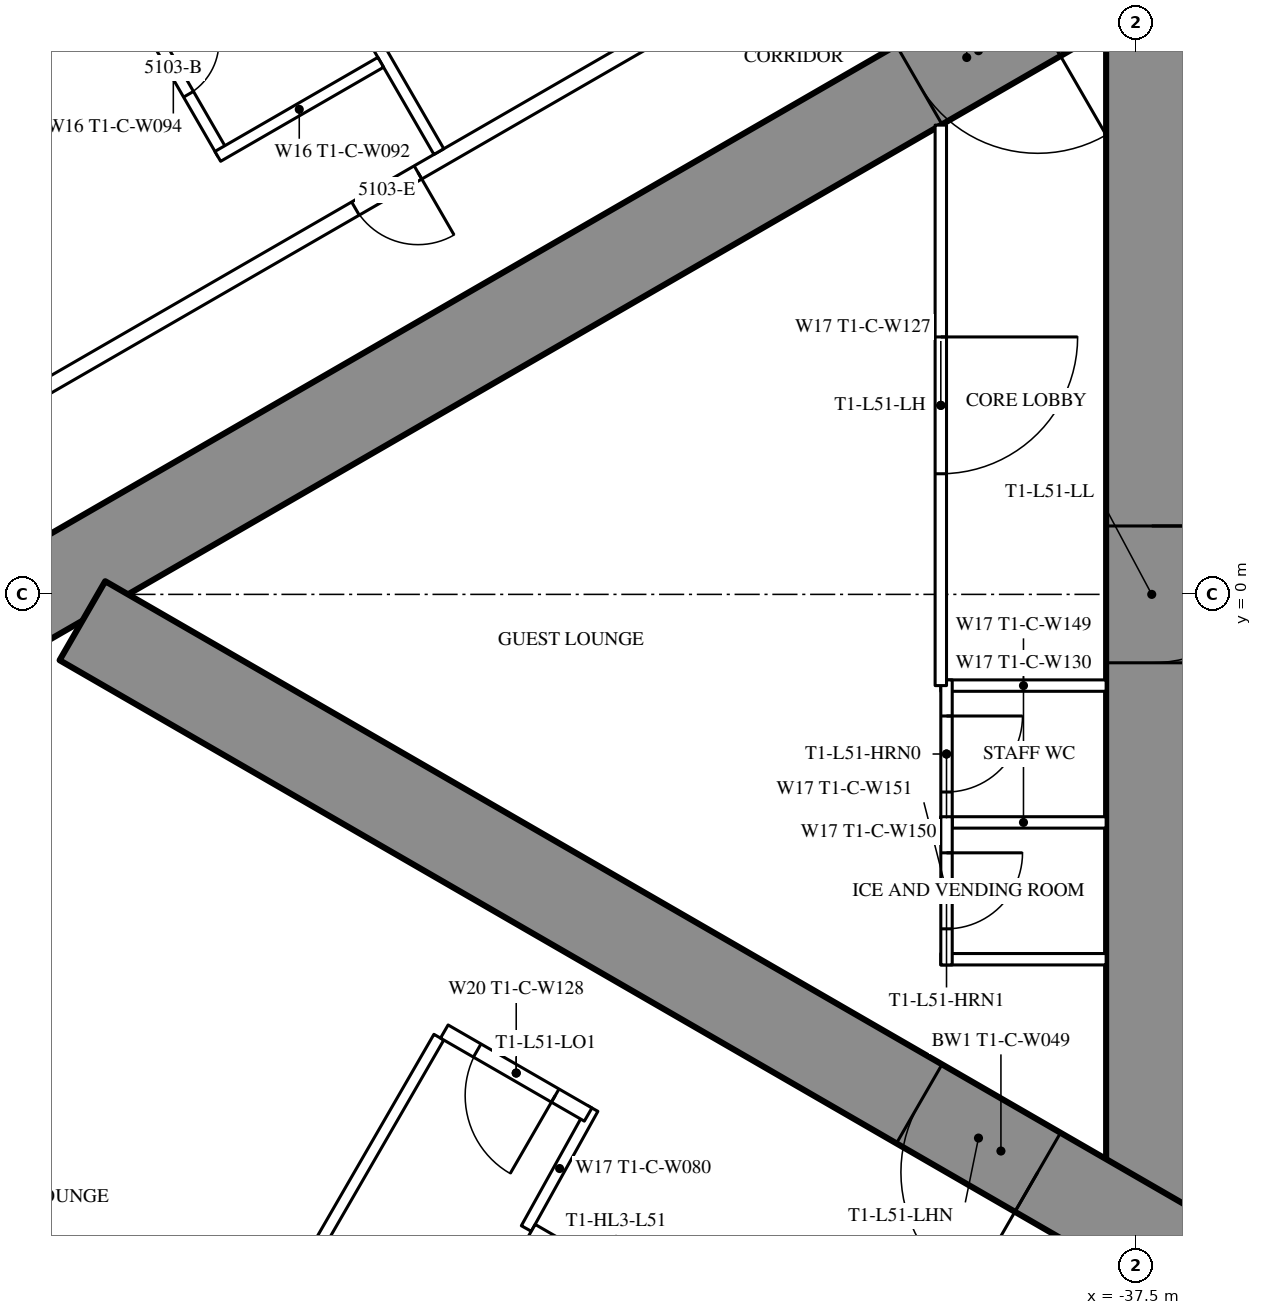
"""IFC4 building model, lengths in metres.
Left out: names, types, materials, properties, quantities, classifications, styles, units other than length and angle.
Written with IfcOpenShell. Run it as: python <this file> out.ifc"""

import sys

from ifc_helpers import new_model, si_unit, direction, frame, frame_2d, origin, place, context, subcontext, project, spatial, rectangle, extrude, element, fill, save


model = new_model("IFC4")
c1 = context("Model", 3, precision=1e-05, world=origin(), true_north=direction((0.0, 1.0)))
c2 = subcontext(c1, "Body", "Model", "MODEL_VIEW")
j1 = project(units=[si_unit("LENGTHUNIT", "METRE"), si_unit("PLANEANGLEUNIT", "RADIAN")], contexts=[c1])
p1 = place(None, origin())
s1 = spatial("IfcSite", under=j1, at=p1, CompositionType="ELEMENT")
p2 = place(p1, origin())
s2 = spatial("IfcBuilding", under=s1, at=p2, CompositionType="ELEMENT")
p3 = place(p2, frame((0.0, 0.0, 191.3)))
s3 = spatial("IfcBuildingStorey", under=s2, at=p3, CompositionType="ELEMENT", Elevation=191.3)
p4 = place(p3, frame((-37.3, 8.6, 0.0), z_axis=(0.0, 0.0, 1.0), x_axis=(0.0, -1.0, 0.0)))
e1 = element("IfcWall", 1, at=p4, inside=s3, PredefinedType="SHEAR", context=c2, shape_type="SweptSolid", body=[
    extrude(rectangle(XDim=17.2, YDim=1.2, at=frame_2d((8.6, 0.0))), origin(), (0.0, 0.0, 1.0), 3.5),
])
p5 = place(p4, frame((7.7, 0.0, 0.0)))
e2 = element("IfcOpeningElement", 2, at=p5, cuts=e1, PredefinedType="OPENING", context=c2, shape_type="SweptSolid", body=[
    extrude(rectangle(XDim=1.8, YDim=2.2, at=frame_2d((0.9, 1.1))), frame((0.0, 0.61, 0.0), z_axis=(0.0, -1.0, 0.0), x_axis=(1.0, 0.0, 0.0)), (0.0, 0.0, 1.0), 1.22),
])
p6 = place(p3, frame((-27.2, 14.3, 0.0), z_axis=(0.0, 0.0, 1.0), x_axis=(-0.866026593062, -0.499997940104, 0.0)))
e3 = element("IfcWall", 3, at=p6, inside=s3, PredefinedType="SHEAR", context=c2, shape_type="SweptSolid", body=[
    extrude(rectangle(XDim=28.946, YDim=1.2, at=frame_2d((14.473, 0.0))), origin(), (0.0, 0.0, 1.0), 3.5),
])
p7 = place(p6, frame((4.6, 0.0, 0.0)))
e4 = element("IfcOpeningElement", 4, at=p7, cuts=e3, PredefinedType="OPENING", context=c2, shape_type="SweptSolid", body=[
    extrude(rectangle(XDim=1.0, YDim=2.2, at=frame_2d((0.5, 1.1))), frame((0.0, 0.61, 0.0), z_axis=(0.0, -1.0, 0.0), x_axis=(1.0, 0.0, 0.0)), (0.0, 0.0, 1.0), 1.22),
])
p8 = place(p6, frame((13.395, 0.0, 0.0)))
e5 = element("IfcOpeningElement", 5, at=p8, cuts=e3, PredefinedType="OPENING", context=c2, shape_type="SweptSolid", body=[
    extrude(rectangle(XDim=1.8, YDim=2.2, at=frame_2d((0.9, 1.1))), frame((0.0, 0.61, 0.0), z_axis=(0.0, -1.0, 0.0), x_axis=(1.0, 0.0, 0.0)), (0.0, 0.0, 1.0), 1.22),
])
p9 = place(p3, frame((-27.2, -14.3, 0.0), z_axis=(0.0, 0.0, 1.0), x_axis=(-0.866024021859, 0.500002393557, 0.0)))
e6 = element("IfcWall", 6, at=p9, inside=s3, PredefinedType="SHEAR", context=c2, shape_type="SweptSolid", body=[
    extrude(rectangle(XDim=27.907, YDim=1.2, at=frame_2d((13.954, 0.0))), origin(), (0.0, 0.0, 1.0), 3.5),
])
p10 = place(p9, frame((4.6, 0.0, 0.0)))
e7 = element("IfcOpeningElement", 7, at=p10, cuts=e6, PredefinedType="OPENING", context=c2, shape_type="SweptSolid", body=[
    extrude(rectangle(XDim=1.0, YDim=2.2, at=frame_2d((0.5, 1.1))), frame((0.0, 0.61, 0.0), z_axis=(0.0, -1.0, 0.0), x_axis=(1.0, 0.0, 0.0)), (0.0, 0.0, 1.0), 1.22),
])
p11 = place(p9, frame((13.395, 0.0, 0.0)))
e8 = element("IfcOpeningElement", 8, at=p11, cuts=e6, PredefinedType="OPENING", context=c2, shape_type="SweptSolid", body=[
    extrude(rectangle(XDim=1.8, YDim=2.2, at=frame_2d((0.9, 1.1))), frame((0.0, 0.61, 0.0), z_axis=(0.0, -1.0, 0.0), x_axis=(1.0, 0.0, 0.0)), (0.0, 0.0, 1.0), 1.22),
])
p12 = place(p3, frame((-27.86, 16.575, 0.0), z_axis=(0.0, 0.0, 1.0), x_axis=(-0.866025533911, -0.499999774615, 0.0)))
e9 = element("IfcWall", 9, at=p12, inside=s3, PredefinedType="PARTITIONING", context=c2, shape_type="SweptSolid", body=[
    extrude(rectangle(XDim=33.149, YDim=0.2, at=frame_2d((16.575, 0.0))), origin(), (0.0, 0.0, 1.0), 3.25),
])
p13 = place(p12, frame((3.75, 0.0, 0.0)))
e10 = element("IfcOpeningElement", 10, at=p13, cuts=e9, PredefinedType="OPENING", context=c2, shape_type="SweptSolid", body=[
    extrude(rectangle(XDim=1.0, YDim=2.2, at=frame_2d((0.5, 1.1))), frame((0.0, 0.11, 0.0), z_axis=(0.0, -1.0, 0.0), x_axis=(1.0, 0.0, 0.0)), (0.0, 0.0, 1.0), 0.22),
])
p14 = place(p12, frame((16.402, 0.0, 0.0)))
e11 = element("IfcOpeningElement", 11, at=p14, cuts=e9, PredefinedType="OPENING", context=c2, shape_type="SweptSolid", body=[
    extrude(rectangle(XDim=0.95, YDim=2.2, at=frame_2d((0.475, 1.1))), frame((0.0, 0.11, 0.0), z_axis=(0.0, -1.0, 0.0), x_axis=(1.0, 0.0, 0.0)), (0.0, 0.0, 1.0), 0.22),
])
p15 = place(p12, frame((22.047, 0.0, 0.0)))
e12 = element("IfcOpeningElement", 12, at=p15, cuts=e9, PredefinedType="OPENING", context=c2, shape_type="SweptSolid", body=[
    extrude(rectangle(XDim=0.95, YDim=2.2, at=frame_2d((0.475, 1.1))), frame((0.0, 0.11, 0.0), z_axis=(0.0, -1.0, 0.0), x_axis=(1.0, 0.0, 0.0)), (0.0, 0.0, 1.0), 0.22),
])
p16 = place(p12, frame((30.396, 0.0, 0.0)))
e13 = element("IfcOpeningElement", 13, at=p16, cuts=e9, PredefinedType="OPENING", context=c2, shape_type="SweptSolid", body=[
    extrude(rectangle(XDim=1.8, YDim=2.2, at=frame_2d((0.9, 1.1))), frame((0.0, 0.11, 0.0), z_axis=(0.0, -1.0, 0.0), x_axis=(1.0, 0.0, 0.0)), (0.0, 0.0, 1.0), 0.22),
])
for number, where, z_axis, x_axis in (
    (14, (-46.679, 5.825, 0.0), (0.0, 0.0, 1.0), (-0.5, 0.866, 0.0)),
    (15, (-46.679, -5.825, 0.0), (0.0, 0.0, 1.0), (-0.5, -0.866, 0.0)),
):
    element("IfcWall", number, at=place(p3, frame(where, z_axis=z_axis, x_axis=x_axis)), inside=s3, PredefinedType="PARTITIONING", context=c2, shape_type="SweptSolid", body=[
        extrude(rectangle(XDim=6.911, YDim=0.15, at=frame_2d((3.456, 0.0))), origin(), (0.0, 0.0, 1.0), 2.3),
    ])
p17 = place(p3, frame((-44.652, -6.764, 0.0), z_axis=(0.0, 0.0, 1.0), x_axis=(-0.485424724123, -0.874278466629, 0.0)))
e16 = element("IfcWall", 16, at=p17, inside=s3, PredefinedType="PARTITIONING", context=c2, shape_type="SweptSolid", body=[
    extrude(rectangle(XDim=1.805, YDim=0.15, at=frame_2d((0.903, 0.0))), origin(), (0.0, 0.0, 1.0), 3.25),
])
p18 = place(p3, frame((-44.715, -6.844, 0.0), z_axis=(0.0, 0.0, 1.0), x_axis=(-0.865999496279, 0.500044870432, 0.0)))
e17 = element("IfcWall", 17, at=p18, inside=s3, PredefinedType="PARTITIONING", context=c2, shape_type="SweptSolid", body=[
    extrude(rectangle(XDim=2.185, YDim=0.2, at=frame_2d((1.092, 0.0))), origin(), (0.0, 0.0, 1.0), 3.25),
])
p19 = place(p18, frame((0.5, 0.0, 0.0)))
e18 = element("IfcOpeningElement", 18, at=p19, cuts=e17, PredefinedType="OPENING", context=c2, shape_type="SweptSolid", body=[
    extrude(rectangle(XDim=1.185, YDim=2.2, at=frame_2d((0.593, 1.1))), frame((0.0, 0.11, 0.0), z_axis=(0.0, -1.0, 0.0), x_axis=(1.0, 0.0, 0.0)), (0.0, 0.0, 1.0), 0.22),
])
p20 = place(p3, frame((-49.522, 5.8, 0.0), z_axis=(0.0, 0.0, 1.0), x_axis=(-0.500006934395, 0.866021400173, 0.0)))
e19 = element("IfcWall", 19, at=p20, inside=s3, PredefinedType="PARTITIONING", context=c2, shape_type="SweptSolid", body=[
    extrude(rectangle(XDim=2.6, YDim=0.15, at=frame_2d((1.3, 0.0))), origin(), (0.0, 0.0, 1.0), 3.25),
])
p21 = place(p20, frame((0.9, 0.0, 0.0)))
e20 = element("IfcOpeningElement", 20, at=p21, cuts=e19, PredefinedType="OPENING", context=c2, shape_type="SweptSolid", body=[
    extrude(rectangle(XDim=0.8, YDim=2.2, at=frame_2d((0.4, 1.1))), frame((0.0, 0.085, 0.0), z_axis=(0.0, -1.0, 0.0), x_axis=(1.0, 0.0, 0.0)), (0.0, 0.0, 1.0), 0.17),
])
p22 = place(p3, frame((-47.444, 7.0, 0.0), z_axis=(0.0, 0.0, 1.0), x_axis=(-0.866006523861, -0.500032699561, 0.0)))
e21 = element("IfcWall", 21, at=p22, inside=s3, PredefinedType="PARTITIONING", context=c2, shape_type="SweptSolid", body=[
    extrude(rectangle(XDim=2.475, YDim=0.15, at=frame_2d((1.237, 0.0))), origin(), (0.0, 0.0, 1.0), 3.25),
])
for number, where, z_axis, x_axis in (
    (22, (-37.9, -1.2, 0.0), (0.0, 0.0, 1.0), (-1.0, 0.0, 0.0)),
    (23, (-37.9, -3.0, 0.0), (0.0, 0.0, 1.0), (-1.0, 0.0, 0.0)),
    (24, (-37.9, -4.8, 0.0), (0.0, 0.0, 1.0), (-1.0, 0.0, 0.0)),
):
    element("IfcWall", number, at=place(p3, frame(where, z_axis=z_axis, x_axis=x_axis)), inside=s3, PredefinedType="PARTITIONING", context=c2, shape_type="SweptSolid", body=[
        extrude(rectangle(XDim=2.175, YDim=0.15, at=frame_2d((1.087, 0.0))), origin(), (0.0, 0.0, 1.0), 3.25),
    ])
p23 = place(p3, frame((-40.0, -1.125, 0.0), z_axis=(0.0, 0.0, 1.0), x_axis=(0.0, -1.0, 0.0)))
e25 = element("IfcWall", 25, at=p23, inside=s3, PredefinedType="PARTITIONING", context=c2, shape_type="SweptSolid", body=[
    extrude(rectangle(XDim=1.95, YDim=0.15, at=frame_2d((0.975, 0.0))), origin(), (0.0, 0.0, 1.0), 3.25),
])
p24 = place(p23, frame((0.475, 0.0, 0.0)))
e26 = element("IfcOpeningElement", 26, at=p24, cuts=e25, PredefinedType="OPENING", context=c2, shape_type="SweptSolid", body=[
    extrude(rectangle(XDim=1.0, YDim=2.2, at=frame_2d((0.5, 1.1))), frame((0.0, 0.085, 0.0), z_axis=(0.0, -1.0, 0.0), x_axis=(1.0, 0.0, 0.0)), (0.0, 0.0, 1.0), 0.17),
])
p25 = place(p3, frame((-40.0, -2.925, 0.0), z_axis=(0.0, 0.0, 1.0), x_axis=(0.0, -1.0, 0.0)))
e27 = element("IfcWall", 27, at=p25, inside=s3, PredefinedType="PARTITIONING", context=c2, shape_type="SweptSolid", body=[
    extrude(rectangle(XDim=1.95, YDim=0.15, at=frame_2d((0.975, 0.0))), origin(), (0.0, 0.0, 1.0), 3.25),
])
p26 = place(p25, frame((0.475, 0.0, 0.0)))
e28 = element("IfcOpeningElement", 28, at=p26, cuts=e27, PredefinedType="OPENING", context=c2, shape_type="SweptSolid", body=[
    extrude(rectangle(XDim=1.0, YDim=2.2, at=frame_2d((0.5, 1.1))), frame((0.0, 0.085, 0.0), z_axis=(0.0, -1.0, 0.0), x_axis=(1.0, 0.0, 0.0)), (0.0, 0.0, 1.0), 0.17),
])
p27 = place(p3, frame((-40.075, 6.174, 0.0), z_axis=(0.0, 0.0, 1.0), x_axis=(0.0, -1.0, 0.0)))
e29 = element("IfcWall", 29, at=p27, inside=s3, PredefinedType="PARTITIONING", context=c2, shape_type="SweptSolid", body=[
    extrude(rectangle(XDim=7.374, YDim=0.15, at=frame_2d((3.687, 0.0))), origin(), (0.0, 0.0, 1.0), 3.25),
])
p28 = place(p27, frame((2.787, 0.0, 0.0)))
e30 = element("IfcOpeningElement", 30, at=p28, cuts=e29, PredefinedType="OPENING", context=c2, shape_type="SweptSolid", body=[
    extrude(rectangle(XDim=1.8, YDim=2.2, at=frame_2d((0.9, 1.1))), frame((0.0, 0.085, 0.0), z_axis=(0.0, -1.0, 0.0), x_axis=(1.0, 0.0, 0.0)), (0.0, 0.0, 1.0), 0.17),
])
p29 = place(p3, frame((-39.758, -11.697, 0.0), z_axis=(0.0, 0.0, 1.0), x_axis=(-0.866024194504, 0.500002094529, 0.0)))
e31 = element("IfcWall", 31, at=p29, inside=s3, PredefinedType="PARTITIONING", context=c2, shape_type="SweptSolid", body=[
    extrude(rectangle(XDim=6.6, YDim=0.25, at=frame_2d((3.3, 0.0))), origin(), (0.0, 0.0, 1.0), 3.25),
])
p30 = place(p29, frame((0.75, 0.0, 0.0)))
e32 = element("IfcOpeningElement", 32, at=p30, cuts=e31, PredefinedType="OPENING", context=c2, shape_type="SweptSolid", body=[
    extrude(rectangle(XDim=1.1, YDim=2.2, at=frame_2d((0.55, 1.1))), frame((0.0, 0.135, 0.0), z_axis=(0.0, -1.0, 0.0), x_axis=(1.0, 0.0, 0.0)), (0.0, 0.0, 1.0), 0.27),
])
p31 = place(p29, frame((2.75, 0.0, 0.0)))
e33 = element("IfcOpeningElement", 33, at=p31, cuts=e31, PredefinedType="OPENING", context=c2, shape_type="SweptSolid", body=[
    extrude(rectangle(XDim=1.1, YDim=2.2, at=frame_2d((0.55, 1.1))), frame((0.0, 0.135, 0.0), z_axis=(0.0, -1.0, 0.0), x_axis=(1.0, 0.0, 0.0)), (0.0, 0.0, 1.0), 0.27),
])
p32 = place(p29, frame((4.75, 0.0, 0.0)))
e34 = element("IfcOpeningElement", 34, at=p32, cuts=e31, PredefinedType="OPENING", context=c2, shape_type="SweptSolid", body=[
    extrude(rectangle(XDim=1.1, YDim=2.2, at=frame_2d((0.55, 1.1))), frame((0.0, 0.135, 0.0), z_axis=(0.0, -1.0, 0.0), x_axis=(1.0, 0.0, 0.0)), (0.0, 0.0, 1.0), 0.27),
])
p33 = place(p21, origin())
e35 = element("IfcDoor", 35, at=p33, inside=s3, OperationType="SINGLE_SWING_RIGHT", PredefinedType="DOOR", context=c2, shape_type="SweptSolid", body=[
    extrude(rectangle(XDim=0.8, YDim=2.2, at=frame_2d((0.4, 1.1))), frame((0.0, 0.025, 0.0), z_axis=(0.0, -1.0, 0.0), x_axis=(1.0, 0.0, 0.0)), (0.0, 0.0, 1.0), 0.05),
])
fill(e20, e35)
p34 = place(p15, origin())
e36 = element("IfcDoor", 36, at=p34, inside=s3, OperationType="SINGLE_SWING_LEFT", PredefinedType="DOOR", context=c2, shape_type="SweptSolid", body=[
    extrude(rectangle(XDim=0.95, YDim=2.2, at=frame_2d((0.475, 1.1))), frame((0.0, 0.025, 0.0), z_axis=(0.0, -1.0, 0.0), x_axis=(1.0, 0.0, 0.0)), (0.0, 0.0, 1.0), 0.05),
])
fill(e12, e36)
p35 = place(p19, origin())
e37 = element("IfcDoor", 37, at=p35, inside=s3, OperationType="SINGLE_SWING_LEFT", PredefinedType="DOOR", context=c2, shape_type="SweptSolid", body=[
    extrude(rectangle(XDim=1.185, YDim=2.2, at=frame_2d((0.593, 1.1))), frame((0.0, 0.025, 0.0), z_axis=(0.0, -1.0, 0.0), x_axis=(1.0, 0.0, 0.0)), (0.0, 0.0, 1.0), 0.05),
])
fill(e18, e37)
p36 = place(p24, origin())
e38 = element("IfcDoor", 38, at=p36, inside=s3, OperationType="SINGLE_SWING_LEFT", PredefinedType="DOOR", context=c2, shape_type="SweptSolid", body=[
    extrude(rectangle(XDim=1.0, YDim=2.2, at=frame_2d((0.5, 1.1))), frame((0.0, 0.025, 0.0), z_axis=(0.0, -1.0, 0.0), x_axis=(1.0, 0.0, 0.0)), (0.0, 0.0, 1.0), 0.05),
])
fill(e26, e38)
p37 = place(p26, origin())
e39 = element("IfcDoor", 39, at=p37, inside=s3, OperationType="SINGLE_SWING_LEFT", PredefinedType="DOOR", context=c2, shape_type="SweptSolid", body=[
    extrude(rectangle(XDim=1.0, YDim=2.2, at=frame_2d((0.5, 1.1))), frame((0.0, 0.025, 0.0), z_axis=(0.0, -1.0, 0.0), x_axis=(1.0, 0.0, 0.0)), (0.0, 0.0, 1.0), 0.05),
])
fill(e28, e39)
p38 = place(p28, origin())
e40 = element("IfcDoor", 40, at=p38, inside=s3, OperationType="DOUBLE_DOOR_SINGLE_SWING", PredefinedType="DOOR", context=c2, shape_type="SweptSolid", body=[
    extrude(rectangle(XDim=1.8, YDim=2.2, at=frame_2d((0.9, 1.1))), frame((0.0, 0.025, 0.0), z_axis=(0.0, -1.0, 0.0), x_axis=(1.0, 0.0, 0.0)), (0.0, 0.0, 1.0), 0.05),
])
fill(e30, e40)
p39 = place(p8, origin())
e41 = element("IfcDoor", 41, at=p39, inside=s3, OperationType="DOUBLE_DOOR_SINGLE_SWING", PredefinedType="DOOR", context=c2, shape_type="SweptSolid", body=[
    extrude(rectangle(XDim=1.8, YDim=2.2, at=frame_2d((0.9, 1.1))), frame((0.0, 0.025, 0.0), z_axis=(0.0, -1.0, 0.0), x_axis=(1.0, 0.0, 0.0)), (0.0, 0.0, 1.0), 0.05),
])
fill(e5, e41)
p40 = place(p11, origin())
e42 = element("IfcDoor", 42, at=p40, inside=s3, OperationType="DOUBLE_DOOR_SINGLE_SWING", PredefinedType="DOOR", context=c2, shape_type="SweptSolid", body=[
    extrude(rectangle(XDim=1.8, YDim=2.2, at=frame_2d((0.9, 1.1))), frame((0.0, 0.025, 0.0), z_axis=(0.0, -1.0, 0.0), x_axis=(1.0, 0.0, 0.0)), (0.0, 0.0, 1.0), 0.05),
])
fill(e8, e42)
p41 = place(p5, origin())
e43 = element("IfcDoor", 43, at=p41, inside=s3, OperationType="DOUBLE_DOOR_SINGLE_SWING", PredefinedType="DOOR", context=c2, shape_type="SweptSolid", body=[
    extrude(rectangle(XDim=1.8, YDim=2.2, at=frame_2d((0.9, 1.1))), frame((0.0, 0.025, 0.0), z_axis=(0.0, -1.0, 0.0), x_axis=(1.0, 0.0, 0.0)), (0.0, 0.0, 1.0), 0.05),
])
fill(e2, e43)
save(model, sys.argv[1])
